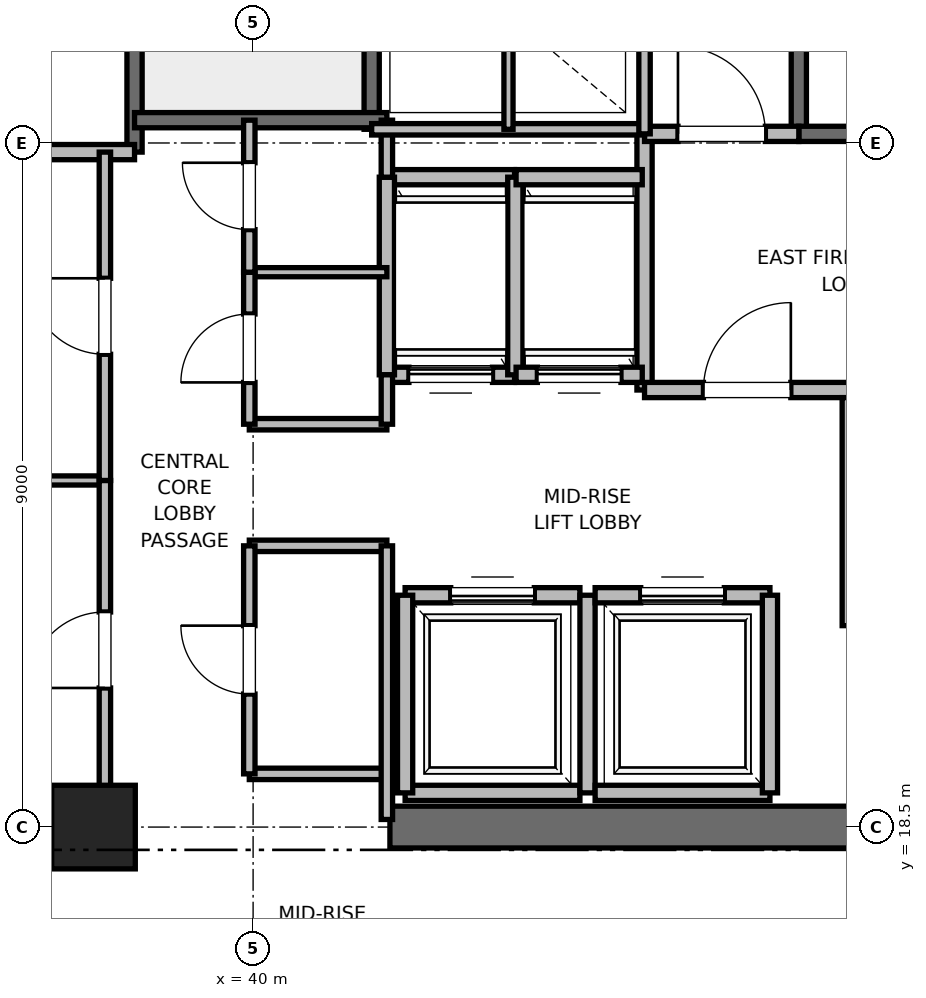
"""IFC4 building model, lengths in metres.
Left out: names, types, materials, properties, quantities, classifications, styles, units other than length and angle.
Written with IfcOpenShell. Run it as: python <this file> out.ifc"""

import sys

from ifc_helpers import new_model, si_unit, direction, frame, frame_2d, origin, origin_2d, place, context, subcontext, project, spatial, rectangle, extrude, element, fill, save


model = new_model("IFC4")
c1 = context("Model", 3, precision=1e-05, world=origin(), true_north=direction((0.0, 1.0)))
c2 = subcontext(c1, "Body", "Model", "MODEL_VIEW")
j1 = project(units=[si_unit("LENGTHUNIT", "METRE"), si_unit("PLANEANGLEUNIT", "RADIAN")], contexts=[c1])
p1 = place(None, origin())
s1 = spatial("IfcSite", under=j1, at=p1, CompositionType="ELEMENT")
p2 = place(p1, origin())
s2 = spatial("IfcBuilding", under=s1, at=p2, CompositionType="ELEMENT")
p3 = place(p2, frame((0.0, 0.0, 180.4)))
s3 = spatial("IfcBuildingStorey", under=s2, at=p3, CompositionType="ELEMENT", Elevation=180.4)
p4 = place(p3, frame((37.9, 18.5, 0.0), z_axis=(0.0, 0.0, 1.0), x_axis=(1.0, 0.0, 0.0)))
e1 = element("IfcColumn", 1, at=p4, inside=s3, PredefinedType="PILASTER", context=c2, shape_type="SweptSolid", body=[
    extrude(rectangle(XDim=1.1, YDim=1.1, at=origin_2d()), origin(), (0.0, 0.0, 1.0), 4.0),
])
for number, where, z_axis, x_axis in (
    (2, (29.0, 18.5, 0.0), (0.0, 0.0, 1.0), (1.0, 0.0, 0.0)),
    (3, (41.8, 18.5, 0.0), (0.0, 0.0, 1.0), (1.0, 0.0, 0.0)),
):
    element("IfcWall", number, at=place(p3, frame(where, z_axis=z_axis, x_axis=x_axis)), inside=s3, PredefinedType="SHEAR", context=c2, shape_type="SweptSolid", body=[
        extrude(rectangle(XDim=9.2, YDim=0.55, at=frame_2d((4.6, 0.0))), origin(), (0.0, 0.0, 1.0), 3.7),
    ])
p5 = place(p3, frame((47.18, 27.62, 0.0), z_axis=(0.0, 0.0, 1.0), x_axis=(0.0, 1.0, 0.0)))
e4 = element("IfcWall", 4, at=p5, inside=s3, PredefinedType="SOLIDWALL", context=c2, shape_type="SweptSolid", body=[
    extrude(rectangle(XDim=8.18, YDim=0.2, at=frame_2d((4.09, 0.0))), origin(), (0.0, 0.0, 1.0), 3.7),
])
p6 = place(p3, frame((47.18, 27.62, 0.0), z_axis=(0.0, 0.0, 1.0), x_axis=(1.0, 0.0, 0.0)))
e5 = element("IfcWall", 5, at=p6, inside=s3, PredefinedType="SOLIDWALL", context=c2, shape_type="SweptSolid", body=[
    extrude(rectangle(XDim=3.12, YDim=0.2, at=frame_2d((1.56, 0.0))), origin(), (0.0, 0.0, 1.0), 3.7),
])
p7 = place(p6, frame((1.01, 0.0, 0.0)))
e6 = element("IfcOpeningElement", 6, at=p7, cuts=e5, PredefinedType="OPENING", context=c2, shape_type="SweptSolid", body=[
    extrude(rectangle(XDim=1.1, YDim=2.15, at=frame_2d((0.55, 1.075))), frame((0.0, 0.1, 0.0), z_axis=(0.0, -1.0, 0.0), x_axis=(1.0, 0.0, 0.0)), (0.0, 0.0, 1.0), 0.2),
])
p8 = place(p3, frame((38.44, 27.38, 0.0), z_axis=(0.0, 0.0, 1.0), x_axis=(0.0, 1.0, 0.0)))
e7 = element("IfcWall", 7, at=p8, inside=s3, PredefinedType="SOLIDWALL", context=c2, shape_type="SweptSolid", body=[
    extrude(rectangle(XDim=8.87, YDim=0.2, at=frame_2d((4.435, 0.0))), origin(), (0.0, 0.0, 1.0), 3.7),
])
p9 = place(p3, frame((41.56, 27.68, 0.0), z_axis=(0.0, 0.0, 1.0), x_axis=(0.0, 1.0, 0.0)))
e8 = element("IfcWall", 8, at=p9, inside=s3, PredefinedType="SOLIDWALL", context=c2, shape_type="SweptSolid", body=[
    extrude(rectangle(XDim=8.57, YDim=0.2, at=frame_2d((4.285, 0.0))), origin(), (0.0, 0.0, 1.0), 3.7),
])
p10 = place(p3, frame((38.44, 27.8, 0.0), z_axis=(0.0, 0.0, 1.0), x_axis=(1.0, 0.0, 0.0)))
e9 = element("IfcWall", 9, at=p10, inside=s3, PredefinedType="SOLIDWALL", context=c2, shape_type="SweptSolid", body=[
    extrude(rectangle(XDim=3.32, YDim=0.2, at=frame_2d((1.66, 0.0))), origin(), (0.0, 0.0, 1.0), 3.7),
])
p11 = place(p3, frame((32.82, 27.38, 0.0), z_axis=(0.0, 0.0, 1.0), x_axis=(1.0, 0.0, 0.0)))
e10 = element("IfcWall", 10, at=p11, inside=s3, PredefinedType="PARTITIONING", context=c2, shape_type="SweptSolid", body=[
    extrude(rectangle(XDim=5.62, YDim=0.2, at=frame_2d((2.81, 0.0))), origin(), (0.0, 0.0, 1.0), 3.7),
])
p12 = place(p3, frame((45.15, 24.25, 0.0), z_axis=(0.0, 0.0, 1.0), x_axis=(0.0, 1.0, 0.0)))
e11 = element("IfcWall", 11, at=p12, inside=s3, PredefinedType="PARTITIONING", context=c2, shape_type="SweptSolid", body=[
    extrude(rectangle(XDim=3.37, YDim=0.2, at=frame_2d((1.685, 0.0))), origin(), (0.0, 0.0, 1.0), 3.7),
])
p13 = place(p3, frame((45.15, 24.25, 0.0), z_axis=(0.0, 0.0, 1.0), x_axis=(1.0, 0.0, 0.0)))
e12 = element("IfcWall", 12, at=p13, inside=s3, PredefinedType="PARTITIONING", context=c2, shape_type="SweptSolid", body=[
    extrude(rectangle(XDim=2.7, YDim=0.2, at=frame_2d((1.35, 0.0))), origin(), (0.0, 0.0, 1.0), 3.7),
])
p14 = place(p13, frame((0.775, 0.0, 0.0)))
e13 = element("IfcOpeningElement", 13, at=p14, cuts=e12, PredefinedType="OPENING", context=c2, shape_type="SweptSolid", body=[
    extrude(rectangle(XDim=1.15, YDim=2.2, at=frame_2d((0.575, 1.1))), frame((0.0, 0.1, 0.0), z_axis=(0.0, -1.0, 0.0), x_axis=(1.0, 0.0, 0.0)), (0.0, 0.0, 1.0), 0.2),
])
p15 = place(p3, frame((45.15, 27.62, 0.0), z_axis=(0.0, 0.0, 1.0), x_axis=(1.0, 0.0, 0.0)))
e14 = element("IfcWall", 14, at=p15, inside=s3, PredefinedType="PARTITIONING", context=c2, shape_type="SweptSolid", body=[
    extrude(rectangle(XDim=2.03, YDim=0.2, at=frame_2d((1.015, 0.0))), origin(), (0.0, 0.0, 1.0), 3.7),
])
p16 = place(p15, frame((0.44, 0.0, 0.0)))
e15 = element("IfcOpeningElement", 15, at=p16, cuts=e14, PredefinedType="OPENING", context=c2, shape_type="SweptSolid", body=[
    extrude(rectangle(XDim=1.15, YDim=2.2, at=frame_2d((0.575, 1.1))), frame((0.0, 0.1, 0.0), z_axis=(0.0, -1.0, 0.0), x_axis=(1.0, 0.0, 0.0)), (0.0, 0.0, 1.0), 0.2),
])
p17 = place(p3, frame((47.85, 24.15, 0.0), z_axis=(0.0, 0.0, 1.0), x_axis=(0.0, -1.0, 0.0)))
e16 = element("IfcWall", 16, at=p17, inside=s3, PredefinedType="SOLIDWALL", context=c2, shape_type="SweptSolid", body=[
    extrude(rectangle(XDim=3.0, YDim=0.2, at=frame_2d((1.5, 0.0))), origin(), (0.0, 0.0, 1.0), 3.7),
])
p18 = place(p3, frame((42.0, 18.95, 0.0), z_axis=(0.0, 0.0, 1.0), x_axis=(1.0, 0.0, 0.0)))
e17 = element("IfcWall", 17, at=p18, inside=s3, PredefinedType="SOLIDWALL", context=c2, shape_type="SweptSolid", body=[
    extrude(rectangle(XDim=2.3, YDim=0.2, at=frame_2d((1.15, 0.0))), origin(), (0.0, 0.0, 1.0), 2.68),
])
p19 = place(p3, frame((44.3, 21.55, 0.0), z_axis=(0.0, 0.0, 1.0), x_axis=(-1.0, 0.0, 0.0)))
e18 = element("IfcWall", 18, at=p19, inside=s3, PredefinedType="SOLIDWALL", context=c2, shape_type="SweptSolid", body=[
    extrude(rectangle(XDim=2.3, YDim=0.2, at=frame_2d((1.15, 0.0))), origin(), (0.0, 0.0, 1.0), 3.7),
])
p20 = place(p19, frame((0.6, 0.0, 0.0)))
e19 = element("IfcOpeningElement", 19, at=p20, cuts=e18, PredefinedType="OPENING", context=c2, shape_type="SweptSolid", body=[
    extrude(rectangle(XDim=1.1, YDim=2.2, at=frame_2d((0.55, 1.1))), frame((0.0, 0.1, 0.0), z_axis=(0.0, -1.0, 0.0), x_axis=(1.0, 0.0, 0.0)), (0.0, 0.0, 1.0), 0.2),
])
p21 = place(p3, frame((42.0, 21.55, 0.0), z_axis=(0.0, 0.0, 1.0), x_axis=(0.0, -1.0, 0.0)))
e20 = element("IfcWall", 20, at=p21, inside=s3, PredefinedType="SOLIDWALL", context=c2, shape_type="SweptSolid", body=[
    extrude(rectangle(XDim=2.6, YDim=0.2, at=frame_2d((1.3, 0.0))), origin(), (0.0, 0.0, 1.0), 2.68),
])
p22 = place(p3, frame((44.4, 18.95, 0.0), z_axis=(0.0, 0.0, 1.0), x_axis=(0.0, 1.0, 0.0)))
e21 = element("IfcWall", 21, at=p22, inside=s3, PredefinedType="SOLIDWALL", context=c2, shape_type="SweptSolid", body=[
    extrude(rectangle(XDim=2.6, YDim=0.2, at=frame_2d((1.3, 0.0))), origin(), (0.0, 0.0, 1.0), 3.7),
])
p23 = place(p3, frame((44.5, 18.95, 0.0), z_axis=(0.0, 0.0, 1.0), x_axis=(1.0, 0.0, 0.0)))
e22 = element("IfcWall", 22, at=p23, inside=s3, PredefinedType="SOLIDWALL", context=c2, shape_type="SweptSolid", body=[
    extrude(rectangle(XDim=2.3, YDim=0.2, at=frame_2d((1.15, 0.0))), origin(), (0.0, 0.0, 1.0), 3.7),
])
p24 = place(p3, frame((46.8, 21.55, 0.0), z_axis=(0.0, 0.0, 1.0), x_axis=(-1.0, 0.0, 0.0)))
e23 = element("IfcWall", 23, at=p24, inside=s3, PredefinedType="SOLIDWALL", context=c2, shape_type="SweptSolid", body=[
    extrude(rectangle(XDim=2.3, YDim=0.2, at=frame_2d((1.15, 0.0))), origin(), (0.0, 0.0, 1.0), 3.7),
])
p25 = place(p24, frame((0.6, 0.0, 0.0)))
e24 = element("IfcOpeningElement", 24, at=p25, cuts=e23, PredefinedType="OPENING", context=c2, shape_type="SweptSolid", body=[
    extrude(rectangle(XDim=1.1, YDim=2.2, at=frame_2d((0.55, 1.1))), frame((0.0, 0.1, 0.0), z_axis=(0.0, -1.0, 0.0), x_axis=(1.0, 0.0, 0.0)), (0.0, 0.0, 1.0), 0.2),
])
p26 = place(p3, frame((46.8, 18.95, 0.0), z_axis=(0.0, 0.0, 1.0), x_axis=(0.0, 1.0, 0.0)))
e25 = element("IfcWall", 25, at=p26, inside=s3, PredefinedType="SOLIDWALL", context=c2, shape_type="SweptSolid", body=[
    extrude(rectangle(XDim=2.6, YDim=0.2, at=frame_2d((1.3, 0.0))), origin(), (0.0, 0.0, 1.0), 3.7),
])
p27 = place(p3, frame((41.76, 24.45, 0.0), z_axis=(0.0, 0.0, 1.0), x_axis=(1.0, 0.0, 0.0)))
e26 = element("IfcWall", 26, at=p27, inside=s3, PredefinedType="SOLIDWALL", context=c2, shape_type="SweptSolid", body=[
    extrude(rectangle(XDim=1.68, YDim=0.2, at=frame_2d((0.84, 0.0))), origin(), (0.0, 0.0, 1.0), 3.7),
])
p28 = place(p27, frame((0.29, 0.0, 0.0)))
e27 = element("IfcOpeningElement", 27, at=p28, cuts=e26, PredefinedType="OPENING", context=c2, shape_type="SweptSolid", body=[
    extrude(rectangle(XDim=1.1, YDim=2.2, at=frame_2d((0.55, 1.1))), frame((0.0, 0.1, 0.0), z_axis=(0.0, -1.0, 0.0), x_axis=(1.0, 0.0, 0.0)), (0.0, 0.0, 1.0), 0.2),
])
p29 = place(p3, frame((43.44, 27.05, 0.0), z_axis=(0.0, 0.0, 1.0), x_axis=(-1.0, 0.0, 0.0)))
e28 = element("IfcWall", 28, at=p29, inside=s3, PredefinedType="SOLIDWALL", context=c2, shape_type="SweptSolid", body=[
    extrude(rectangle(XDim=1.68, YDim=0.2, at=frame_2d((0.84, 0.0))), origin(), (0.0, 0.0, 1.0), 3.7),
])
for number, where, z_axis, x_axis in (
    (29, (41.76, 27.05, 0.0), (0.0, 0.0, 1.0), (0.0, -1.0, 0.0)),
    (30, (43.45, 24.45, 0.0), (0.0, 0.0, 1.0), (0.0, 1.0, 0.0)),
):
    element("IfcWall", number, at=place(p3, frame(where, z_axis=z_axis, x_axis=x_axis)), inside=s3, PredefinedType="SOLIDWALL", context=c2, shape_type="SweptSolid", body=[
        extrude(rectangle(XDim=2.6, YDim=0.2, at=frame_2d((1.3, 0.0))), origin(), (0.0, 0.0, 1.0), 3.7),
    ])
p30 = place(p3, frame((43.46, 24.45, 0.0), z_axis=(0.0, 0.0, 1.0), x_axis=(1.0, 0.0, 0.0)))
e31 = element("IfcWall", 31, at=p30, inside=s3, PredefinedType="SOLIDWALL", context=c2, shape_type="SweptSolid", body=[
    extrude(rectangle(XDim=1.66, YDim=0.2, at=frame_2d((0.83, 0.0))), origin(), (0.0, 0.0, 1.0), 3.7),
])
p31 = place(p30, frame((0.28, 0.0, 0.0)))
e32 = element("IfcOpeningElement", 32, at=p31, cuts=e31, PredefinedType="OPENING", context=c2, shape_type="SweptSolid", body=[
    extrude(rectangle(XDim=1.1, YDim=2.2, at=frame_2d((0.55, 1.1))), frame((0.0, 0.1, 0.0), z_axis=(0.0, -1.0, 0.0), x_axis=(1.0, 0.0, 0.0)), (0.0, 0.0, 1.0), 0.2),
])
p32 = place(p3, frame((45.12, 27.05, 0.0), z_axis=(0.0, 0.0, 1.0), x_axis=(-1.0, 0.0, 0.0)))
e33 = element("IfcWall", 33, at=p32, inside=s3, PredefinedType="SOLIDWALL", context=c2, shape_type="SweptSolid", body=[
    extrude(rectangle(XDim=1.66, YDim=0.2, at=frame_2d((0.83, 0.0))), origin(), (0.0, 0.0, 1.0), 3.7),
])
for number, where, z_axis, x_axis in (
    (34, (39.95, 19.2, 0.0), (0.0, 0.0, 1.0), (1.0, 0.0, 0.0)),
    (35, (39.95, 22.2, 0.0), (0.0, 0.0, 1.0), (1.0, 0.0, 0.0)),
    (36, (39.95, 23.8, 0.0), (0.0, 0.0, 1.0), (1.0, 0.0, 0.0)),
):
    element("IfcWall", number, at=place(p3, frame(where, z_axis=z_axis, x_axis=x_axis)), inside=s3, PredefinedType="PARTITIONING", context=c2, shape_type="SweptSolid", body=[
        extrude(rectangle(XDim=1.81, YDim=0.15, at=frame_2d((0.905, 0.0))), origin(), (0.0, 0.0, 1.0), 2.85),
    ])
p33 = place(p3, frame((39.95, 25.8, 0.0), z_axis=(0.0, 0.0, 1.0), x_axis=(1.0, 0.0, 0.0)))
e37 = element("IfcWall", 37, at=p33, inside=s3, PredefinedType="PARTITIONING", context=c2, shape_type="SweptSolid", body=[
    extrude(rectangle(XDim=1.81, YDim=0.12, at=frame_2d((0.905, 0.0))), origin(), (0.0, 0.0, 1.0), 2.85),
])
p34 = place(p3, frame((41.76, 18.6, 0.0), z_axis=(0.0, 0.0, 1.0), x_axis=(0.0, 1.0, 0.0)))
e38 = element("IfcWall", 38, at=p34, inside=s3, PredefinedType="PARTITIONING", context=c2, shape_type="SweptSolid", body=[
    extrude(rectangle(XDim=3.6, YDim=0.15, at=frame_2d((1.8, 0.0))), origin(), (0.0, 0.0, 1.0), 2.68),
])
p35 = place(p3, frame((41.76, 23.8, 0.0), z_axis=(0.0, 0.0, 1.0), x_axis=(0.0, 1.0, 0.0)))
e39 = element("IfcWall", 39, at=p35, inside=s3, PredefinedType="PARTITIONING", context=c2, shape_type="SweptSolid", body=[
    extrude(rectangle(XDim=0.65, YDim=0.15, at=frame_2d((0.325, 0.0))), origin(), (0.0, 0.0, 1.0), 2.85),
])
p36 = place(p3, frame((41.76, 27.05, 0.0), z_axis=(0.0, 0.0, 1.0), x_axis=(0.0, 1.0, 0.0)))
e40 = element("IfcWall", 40, at=p36, inside=s3, PredefinedType="PARTITIONING", context=c2, shape_type="SweptSolid", body=[
    extrude(rectangle(XDim=0.75, YDim=0.15, at=frame_2d((0.375, 0.0))), origin(), (0.0, 0.0, 1.0), 2.85),
])
p37 = place(p3, frame((39.95, 19.2, 0.0), z_axis=(0.0, 0.0, 1.0), x_axis=(0.0, 1.0, 0.0)))
e41 = element("IfcWall", 41, at=p37, inside=s3, PredefinedType="PARTITIONING", context=c2, shape_type="SweptSolid", body=[
    extrude(rectangle(XDim=3.0, YDim=0.15, at=frame_2d((1.5, 0.0))), origin(), (0.0, 0.0, 1.0), 2.85),
])
p38 = place(p37, frame((1.05, 0.0, 0.0)))
e42 = element("IfcOpeningElement", 42, at=p38, cuts=e41, PredefinedType="OPENING", context=c2, shape_type="SweptSolid", body=[
    extrude(rectangle(XDim=0.9, YDim=2.1, at=frame_2d((0.45, 1.05))), frame((0.0, 0.075, 0.0), z_axis=(0.0, -1.0, 0.0), x_axis=(1.0, 0.0, 0.0)), (0.0, 0.0, 1.0), 0.15),
])
p39 = place(p3, frame((39.95, 23.8, 0.0), z_axis=(0.0, 0.0, 1.0), x_axis=(0.0, 1.0, 0.0)))
e43 = element("IfcWall", 43, at=p39, inside=s3, PredefinedType="PARTITIONING", context=c2, shape_type="SweptSolid", body=[
    extrude(rectangle(XDim=2.0, YDim=0.15, at=frame_2d((1.0, 0.0))), origin(), (0.0, 0.0, 1.0), 2.85),
])
p40 = place(p39, frame((0.55, 0.0, 0.0)))
e44 = element("IfcOpeningElement", 44, at=p40, cuts=e43, PredefinedType="OPENING", context=c2, shape_type="SweptSolid", body=[
    extrude(rectangle(XDim=0.9, YDim=2.1, at=frame_2d((0.45, 1.05))), frame((0.0, 0.075, 0.0), z_axis=(0.0, -1.0, 0.0), x_axis=(1.0, 0.0, 0.0)), (0.0, 0.0, 1.0), 0.15),
])
p41 = place(p3, frame((39.95, 25.8, 0.0), z_axis=(0.0, 0.0, 1.0), x_axis=(0.0, 1.0, 0.0)))
e45 = element("IfcWall", 45, at=p41, inside=s3, PredefinedType="PARTITIONING", context=c2, shape_type="SweptSolid", body=[
    extrude(rectangle(XDim=2.0, YDim=0.15, at=frame_2d((1.0, 0.0))), origin(), (0.0, 0.0, 1.0), 2.85),
])
p42 = place(p41, frame((0.56, 0.0, 0.0)))
e46 = element("IfcOpeningElement", 46, at=p42, cuts=e45, PredefinedType="OPENING", context=c2, shape_type="SweptSolid", body=[
    extrude(rectangle(XDim=0.88, YDim=2.1, at=frame_2d((0.44, 1.05))), frame((0.0, 0.075, 0.0), z_axis=(0.0, -1.0, 0.0), x_axis=(1.0, 0.0, 0.0)), (0.0, 0.0, 1.0), 0.15),
])
p43 = place(p3, frame((32.82, 23.06, 0.0), z_axis=(0.0, 0.0, 1.0), x_axis=(1.0, 0.0, 0.0)))
e47 = element("IfcWall", 47, at=p43, inside=s3, PredefinedType="PARTITIONING", context=c2, shape_type="SweptSolid", body=[
    extrude(rectangle(XDim=5.23, YDim=0.12, at=frame_2d((2.615, 0.0))), origin(), (0.0, 0.0, 1.0), 2.85),
])
p44 = place(p3, frame((38.05, 18.6, 0.0), z_axis=(0.0, 0.0, 1.0), x_axis=(0.0, 1.0, 0.0)))
e48 = element("IfcWall", 48, at=p44, inside=s3, PredefinedType="PARTITIONING", context=c2, shape_type="SweptSolid", body=[
    extrude(rectangle(XDim=4.46, YDim=0.15, at=frame_2d((2.23, 0.0))), origin(), (0.0, 0.0, 1.0), 2.68),
])
p45 = place(p44, frame((1.73, 0.0, 0.0)))
e49 = element("IfcOpeningElement", 49, at=p45, cuts=e48, PredefinedType="OPENING", context=c2, shape_type="SweptSolid", body=[
    extrude(rectangle(XDim=1.0, YDim=2.15, at=frame_2d((0.5, 1.075))), frame((0.0, 0.075, 0.0), z_axis=(0.0, -1.0, 0.0), x_axis=(1.0, 0.0, 0.0)), (0.0, 0.0, 1.0), 0.15),
])
p46 = place(p3, frame((38.05, 23.06, 0.0), z_axis=(0.0, 0.0, 1.0), x_axis=(0.0, 1.0, 0.0)))
e50 = element("IfcWall", 50, at=p46, inside=s3, PredefinedType="PARTITIONING", context=c2, shape_type="SweptSolid", body=[
    extrude(rectangle(XDim=4.32, YDim=0.15, at=frame_2d((2.16, 0.0))), origin(), (0.0, 0.0, 1.0), 2.85),
])
p47 = place(p46, frame((1.66, 0.0, 0.0)))
e51 = element("IfcOpeningElement", 51, at=p47, cuts=e50, PredefinedType="OPENING", context=c2, shape_type="SweptSolid", body=[
    extrude(rectangle(XDim=1.0, YDim=2.15, at=frame_2d((0.5, 1.075))), frame((0.0, 0.075, 0.0), z_axis=(0.0, -1.0, 0.0), x_axis=(1.0, 0.0, 0.0)), (0.0, 0.0, 1.0), 0.15),
])
p48 = place(p3, frame((41.56, 27.68, 0.0), z_axis=(0.0, 0.0, 1.0), x_axis=(1.0, 0.0, 0.0)))
e52 = element("IfcWall", 52, at=p48, inside=s3, PredefinedType="PARTITIONING", context=c2, shape_type="SweptSolid", body=[
    extrude(rectangle(XDim=3.59, YDim=0.15, at=frame_2d((1.795, 0.0))), origin(), (0.0, 0.0, 1.0), 2.85),
])
p49 = place(p3, frame((45.15, 27.62, 0.0), z_axis=(0.0, 0.0, 1.0), x_axis=(0.0, 1.0, 0.0)))
e53 = element("IfcWall", 53, at=p49, inside=s3, PredefinedType="PARTITIONING", context=c2, shape_type="SweptSolid", body=[
    extrude(rectangle(XDim=3.1, YDim=0.15, at=frame_2d((1.55, 0.0))), origin(), (0.0, 0.0, 1.0), 2.85),
])
p50 = place(p3, frame((43.36, 27.68, 0.0), z_axis=(0.0, 0.0, 1.0), x_axis=(0.0, 1.0, 0.0)))
e54 = element("IfcWall", 54, at=p50, inside=s3, PredefinedType="PARTITIONING", context=c2, shape_type="SweptSolid", body=[
    extrude(rectangle(XDim=3.04, YDim=0.12, at=frame_2d((1.52, 0.0))), origin(), (0.0, 0.0, 1.0), 2.85),
])
p51 = place(p14, origin())
e55 = element("IfcDoor", 55, at=p51, inside=s3, OperationType="SINGLE_SWING_RIGHT", PredefinedType="DOOR", context=c2, shape_type="SweptSolid", body=[
    extrude(rectangle(XDim=1.15, YDim=2.2, at=frame_2d((0.575, 1.1))), frame((0.0, 0.025, 0.0), z_axis=(0.0, -1.0, 0.0), x_axis=(1.0, 0.0, 0.0)), (0.0, 0.0, 1.0), 0.05),
])
fill(e13, e55)
p52 = place(p16, origin())
e56 = element("IfcDoor", 56, at=p52, inside=s3, OperationType="SINGLE_SWING_LEFT", PredefinedType="DOOR", context=c2, shape_type="SweptSolid", body=[
    extrude(rectangle(XDim=1.15, YDim=2.2, at=frame_2d((0.575, 1.1))), frame((0.0, 0.025, 0.0), z_axis=(0.0, -1.0, 0.0), x_axis=(1.0, 0.0, 0.0)), (0.0, 0.0, 1.0), 0.05),
])
fill(e15, e56)
p53 = place(p20, origin())
e57 = element("IfcDoor", 57, at=p53, inside=s3, OperationType="SLIDING_TO_RIGHT", PredefinedType="DOOR", context=c2, shape_type="SweptSolid", body=[
    extrude(rectangle(XDim=1.1, YDim=2.2, at=frame_2d((0.55, 1.1))), frame((0.0, 0.025, 0.0), z_axis=(0.0, -1.0, 0.0), x_axis=(1.0, 0.0, 0.0)), (0.0, 0.0, 1.0), 0.05),
])
fill(e19, e57)
p54 = place(p25, origin())
e58 = element("IfcDoor", 58, at=p54, inside=s3, OperationType="SLIDING_TO_RIGHT", PredefinedType="DOOR", context=c2, shape_type="SweptSolid", body=[
    extrude(rectangle(XDim=1.1, YDim=2.2, at=frame_2d((0.55, 1.1))), frame((0.0, 0.025, 0.0), z_axis=(0.0, -1.0, 0.0), x_axis=(1.0, 0.0, 0.0)), (0.0, 0.0, 1.0), 0.05),
])
fill(e24, e58)
p55 = place(p28, origin())
e59 = element("IfcDoor", 59, at=p55, inside=s3, OperationType="SLIDING_TO_RIGHT", PredefinedType="DOOR", context=c2, shape_type="SweptSolid", body=[
    extrude(rectangle(XDim=1.1, YDim=2.2, at=frame_2d((0.55, 1.1))), frame((0.0, 0.025, 0.0), z_axis=(0.0, -1.0, 0.0), x_axis=(1.0, 0.0, 0.0)), (0.0, 0.0, 1.0), 0.05),
])
fill(e27, e59)
p56 = place(p31, origin())
e60 = element("IfcDoor", 60, at=p56, inside=s3, OperationType="SLIDING_TO_RIGHT", PredefinedType="DOOR", context=c2, shape_type="SweptSolid", body=[
    extrude(rectangle(XDim=1.1, YDim=2.2, at=frame_2d((0.55, 1.1))), frame((0.0, 0.025, 0.0), z_axis=(0.0, -1.0, 0.0), x_axis=(1.0, 0.0, 0.0)), (0.0, 0.0, 1.0), 0.05),
])
fill(e32, e60)
p57 = place(p38, origin())
e61 = element("IfcDoor", 61, at=p57, inside=s3, OperationType="SINGLE_SWING_RIGHT", PredefinedType="DOOR", context=c2, shape_type="SweptSolid", body=[
    extrude(rectangle(XDim=0.9, YDim=2.1, at=frame_2d((0.45, 1.05))), frame((0.0, 0.025, 0.0), z_axis=(0.0, -1.0, 0.0), x_axis=(1.0, 0.0, 0.0)), (0.0, 0.0, 1.0), 0.05),
])
fill(e42, e61)
p58 = place(p40, origin())
e62 = element("IfcDoor", 62, at=p58, inside=s3, OperationType="SINGLE_SWING_LEFT", PredefinedType="DOOR", context=c2, shape_type="SweptSolid", body=[
    extrude(rectangle(XDim=0.9, YDim=2.1, at=frame_2d((0.45, 1.05))), frame((0.0, 0.025, 0.0), z_axis=(0.0, -1.0, 0.0), x_axis=(1.0, 0.0, 0.0)), (0.0, 0.0, 1.0), 0.05),
])
fill(e44, e62)
p59 = place(p42, origin())
e63 = element("IfcDoor", 63, at=p59, inside=s3, OperationType="SINGLE_SWING_RIGHT", PredefinedType="DOOR", context=c2, shape_type="SweptSolid", body=[
    extrude(rectangle(XDim=0.88, YDim=2.1, at=frame_2d((0.44, 1.05))), frame((0.0, 0.025, 0.0), z_axis=(0.0, -1.0, 0.0), x_axis=(1.0, 0.0, 0.0)), (0.0, 0.0, 1.0), 0.05),
])
fill(e46, e63)
p60 = place(p45, origin())
e64 = element("IfcDoor", 64, at=p60, inside=s3, OperationType="SINGLE_SWING_LEFT", PredefinedType="DOOR", context=c2, shape_type="SweptSolid", body=[
    extrude(rectangle(XDim=1.0, YDim=2.15, at=frame_2d((0.5, 1.075))), frame((0.0, 0.025, 0.0), z_axis=(0.0, -1.0, 0.0), x_axis=(1.0, 0.0, 0.0)), (0.0, 0.0, 1.0), 0.05),
])
fill(e49, e64)
p61 = place(p47, origin())
e65 = element("IfcDoor", 65, at=p61, inside=s3, OperationType="SINGLE_SWING_RIGHT", PredefinedType="DOOR", context=c2, shape_type="SweptSolid", body=[
    extrude(rectangle(XDim=1.0, YDim=2.15, at=frame_2d((0.5, 1.075))), frame((0.0, 0.025, 0.0), z_axis=(0.0, -1.0, 0.0), x_axis=(1.0, 0.0, 0.0)), (0.0, 0.0, 1.0), 0.05),
])
fill(e51, e65)
save(model, sys.argv[1])
